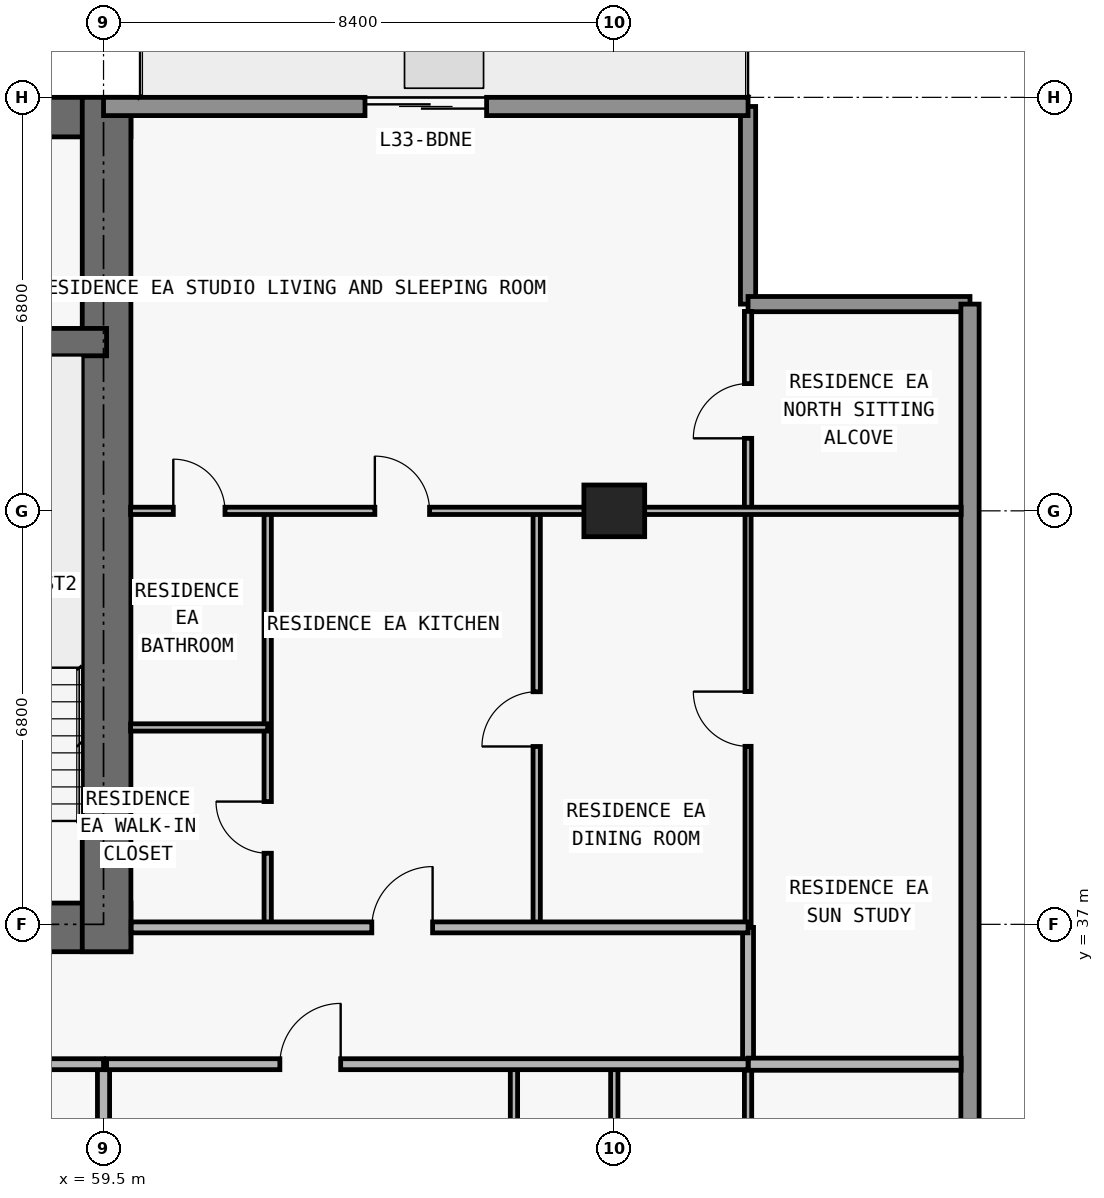
"""IFC4 building model, lengths in metres.
Left out: names, types, materials, properties, quantities, classifications, styles, units other than length and angle.
Written with IfcOpenShell. Run it as: python <this file> out.ifc"""

import sys

from ifc_helpers import new_model, si_unit, direction, frame, frame_2d, origin, origin_2d, place, context, subcontext, project, spatial, rectangle, extrude, element, fill, save


model = new_model("IFC4")
c1 = context("Model", 3, precision=1e-05, world=origin(), true_north=direction((0.0, 1.0)))
c2 = subcontext(c1, "Body", "Model", "MODEL_VIEW")
j1 = project(units=[si_unit("LENGTHUNIT", "METRE"), si_unit("PLANEANGLEUNIT", "RADIAN")], contexts=[c1])
p1 = place(None, origin())
s1 = spatial("IfcSite", under=j1, at=p1, CompositionType="ELEMENT")
p2 = place(p1, origin())
s2 = spatial("IfcBuilding", under=s1, at=p2, CompositionType="ELEMENT")
p3 = place(p2, frame((0.0, 0.0, 122.4)))
s3 = spatial("IfcBuildingStorey", under=s2, at=p3, CompositionType="ELEMENT", Elevation=122.4)
p4 = place(p3, frame((67.9, 43.8, 0.0), z_axis=(0.0, 0.0, 1.0), x_axis=(1.0, 0.0, 0.0)))
e1 = element("IfcColumn", 1, at=p4, inside=s3, PredefinedType="COLUMN", context=c2, shape_type="SweptSolid", body=[
    extrude(rectangle(XDim=1.0, YDim=0.85, at=origin_2d()), origin(), (0.0, 0.0, 1.0), 3.05),
])
p5 = place(p3, frame((17.85, 36.95, 0.0), z_axis=(0.0, 0.0, 1.0), x_axis=(1.0, 0.0, 0.0)))
e2 = element("IfcWall", 2, at=p5, inside=s3, PredefinedType="SHEAR", context=c2, shape_type="SweptSolid", body=[
    extrude(rectangle(XDim=42.1, YDim=0.8, at=frame_2d((21.05, 0.0))), origin(), (0.0, 0.0, 1.0), 3.05),
])
p6 = place(p5, frame((14.45, 0.0, 0.0)))
e3 = element("IfcOpeningElement", 3, at=p6, cuts=e2, PredefinedType="OPENING", context=c2, shape_type="SweptSolid", body=[
    extrude(rectangle(XDim=1.1, YDim=2.15, at=frame_2d((0.55, 1.075))), frame((0.0, 0.41, 0.0), z_axis=(0.0, -1.0, 0.0), x_axis=(1.0, 0.0, 0.0)), (0.0, 0.0, 1.0), 0.82),
])
p7 = place(p5, frame((6.3, 0.0, 0.0)))
e4 = element("IfcOpeningElement", 4, at=p7, cuts=e2, PredefinedType="OPENING", context=c2, shape_type="SweptSolid", body=[
    extrude(rectangle(XDim=1.05, YDim=2.15, at=frame_2d((0.525, 1.075))), frame((0.0, 0.41, 0.0), z_axis=(0.0, -1.0, 0.0), x_axis=(1.0, 0.0, 0.0)), (0.0, 0.0, 1.0), 0.82),
])
p8 = place(p5, frame((34.8, 0.0, 0.0)))
e5 = element("IfcOpeningElement", 5, at=p8, cuts=e2, PredefinedType="OPENING", context=c2, shape_type="SweptSolid", body=[
    extrude(rectangle(XDim=1.05, YDim=2.15, at=frame_2d((0.525, 1.075))), frame((0.0, 0.41, 0.0), z_axis=(0.0, -1.0, 0.0), x_axis=(1.0, 0.0, 0.0)), (0.0, 0.0, 1.0), 0.82),
])
p9 = place(p5, frame((10.913, 0.0, 0.0)))
e6 = element("IfcOpeningElement", 6, at=p9, cuts=e2, PredefinedType="OPENING", context=c2, shape_type="SweptSolid", body=[
    extrude(rectangle(XDim=1.05, YDim=2.15, at=frame_2d((0.525, 1.075))), frame((0.0, 0.41, 0.0), z_axis=(0.0, -1.0, 0.0), x_axis=(1.0, 0.0, 0.0)), (0.0, 0.0, 1.0), 0.82),
])
p10 = place(p5, frame((24.15, 0.0, 0.0)))
e7 = element("IfcOpeningElement", 7, at=p10, cuts=e2, PredefinedType="OPENING", context=c2, shape_type="SweptSolid", body=[
    extrude(rectangle(XDim=1.05, YDim=2.15, at=frame_2d((0.525, 1.075))), frame((0.0, 0.41, 0.0), z_axis=(0.0, -1.0, 0.0), x_axis=(1.0, 0.0, 0.0)), (0.0, 0.0, 1.0), 0.82),
])
p11 = place(p3, frame((17.85, 50.275, 0.0), z_axis=(0.0, 0.0, 1.0), x_axis=(1.0, 0.0, 0.0)))
e8 = element("IfcWall", 8, at=p11, inside=s3, PredefinedType="SHEAR", context=c2, shape_type="SweptSolid", body=[
    extrude(rectangle(XDim=42.1, YDim=0.65, at=frame_2d((21.05, 0.0))), origin(), (0.0, 0.0, 1.0), 3.05),
])
p12 = place(p3, frame((59.55, 36.55, 0.0), z_axis=(0.0, 0.0, 1.0), x_axis=(0.0, 1.0, 0.0)))
e9 = element("IfcWall", 9, at=p12, inside=s3, PredefinedType="SHEAR", context=c2, shape_type="SweptSolid", body=[
    extrude(rectangle(XDim=14.05, YDim=0.8, at=frame_2d((7.025, 0.0))), origin(), (0.0, 0.0, 1.0), 3.05),
])
p13 = place(p3, frame((18.25, 46.575, 0.0), z_axis=(0.0, 0.0, 1.0), x_axis=(1.0, 0.0, 0.0)))
e10 = element("IfcWall", 10, at=p13, inside=s3, PredefinedType="SHEAR", context=c2, shape_type="SweptSolid", body=[
    extrude(rectangle(XDim=41.3, YDim=0.45, at=frame_2d((20.65, 0.0))), origin(), (0.0, 0.0, 1.0), 3.05),
])
p14 = place(p13, frame((7.65, 0.0, 0.0)))
e11 = element("IfcOpeningElement", 11, at=p14, cuts=e10, PredefinedType="OPENING", context=c2, shape_type="SweptSolid", body=[
    extrude(rectangle(XDim=1.0, YDim=2.2, at=frame_2d((0.5, 1.1))), frame((0.0, 0.235, 0.0), z_axis=(0.0, -1.0, 0.0), x_axis=(1.0, 0.0, 0.0)), (0.0, 0.0, 1.0), 0.47),
])
p15 = place(p13, frame((32.675, 0.0, 0.0)))
e12 = element("IfcOpeningElement", 12, at=p15, cuts=e10, PredefinedType="OPENING", context=c2, shape_type="SweptSolid", body=[
    extrude(rectangle(XDim=1.05, YDim=2.15, at=frame_2d((0.525, 1.075))), frame((0.0, 0.235, 0.0), z_axis=(0.0, -1.0, 0.0), x_axis=(1.0, 0.0, 0.0)), (0.0, 0.0, 1.0), 0.47),
])
p16 = place(p3, frame((70.1, 50.45, 0.0), z_axis=(0.0, 0.0, 1.0), x_axis=(0.0, -1.0, 0.0)))
e13 = element("IfcWall", 13, at=p16, inside=s3, PredefinedType="ELEMENTEDWALL", context=c2, shape_type="SweptSolid", body=[
    extrude(rectangle(XDim=3.25, YDim=0.25, at=frame_2d((1.625, 0.0))), origin(), (0.0, 0.0, 1.0), 3.05),
])
p17 = place(p3, frame((70.1, 47.2, 0.0), z_axis=(0.0, 0.0, 1.0), x_axis=(1.0, 0.0, 0.0)))
e14 = element("IfcWall", 14, at=p17, inside=s3, PredefinedType="ELEMENTEDWALL", context=c2, shape_type="SweptSolid", body=[
    extrude(rectangle(XDim=3.65, YDim=0.25, at=frame_2d((1.825, 0.0))), origin(), (0.0, 0.0, 1.0), 3.05),
])
p18 = place(p3, frame((73.75, 47.2, 0.0), z_axis=(0.0, 0.0, 1.0), x_axis=(0.0, -1.0, 0.0)))
e15 = element("IfcWall", 15, at=p18, inside=s3, PredefinedType="STANDARD", context=c2, shape_type="SweptSolid", body=[
    extrude(rectangle(XDim=19.2, YDim=0.3, at=frame_2d((9.6, 0.0))), origin(), (0.0, 0.0, 1.0), 3.05),
])
p19 = place(p3, frame((59.5, 50.45, 0.0), z_axis=(0.0, 0.0, 1.0), x_axis=(1.0, 0.0, 0.0)))
e16 = element("IfcWall", 16, at=p19, inside=s3, PredefinedType="STANDARD", context=c2, shape_type="SweptSolid", body=[
    extrude(rectangle(XDim=10.6, YDim=0.3, at=frame_2d((5.3, 0.0))), origin(), (0.0, 0.0, 1.0), 3.05),
])
p20 = place(p19, frame((4.3, 0.0, 0.0)))
e17 = element("IfcOpeningElement", 17, at=p20, cuts=e16, PredefinedType="OPENING", context=c2, shape_type="SweptSolid", body=[
    extrude(rectangle(XDim=2.0, YDim=2.3, at=frame_2d((1.0, 1.15))), frame((0.0, 0.16, 0.0), z_axis=(0.0, -1.0, 0.0), x_axis=(1.0, 0.0, 0.0)), (0.0, 0.0, 1.0), 0.32),
])
p21 = place(p3, frame((59.5, 26.64, 0.0), z_axis=(0.0, 0.0, 1.0), x_axis=(0.0, 1.0, 0.0)))
e18 = element("IfcWall", 18, at=p21, inside=s3, PredefinedType="PARTITIONING", context=c2, shape_type="SweptSolid", body=[
    extrude(rectangle(XDim=8.06, YDim=0.2, at=frame_2d((4.03, 0.0))), origin(), (0.0, 0.0, 1.0), 2.174),
])
p22 = place(p3, frame((62.2, 36.95, 0.0), z_axis=(0.0, 0.0, 1.0), x_axis=(0.0, 1.0, 0.0)))
e19 = element("IfcWall", 19, at=p22, inside=s3, PredefinedType="PARTITIONING", context=c2, shape_type="SweptSolid", body=[
    extrude(rectangle(XDim=6.85, YDim=0.12, at=frame_2d((3.425, 0.0))), origin(), (0.0, 0.0, 1.0), 3.05),
])
p23 = place(p22, frame((1.219, 0.0, 0.0)))
e20 = element("IfcOpeningElement", 20, at=p23, cuts=e19, PredefinedType="OPENING", context=c2, shape_type="SweptSolid", body=[
    extrude(rectangle(XDim=0.85, YDim=2.1, at=frame_2d((0.425, 1.05))), frame((0.0, 0.07, 0.0), z_axis=(0.0, -1.0, 0.0), x_axis=(1.0, 0.0, 0.0)), (0.0, 0.0, 1.0), 0.14),
])
p24 = place(p3, frame((66.25, 26.64, 0.0), z_axis=(0.0, 0.0, 1.0), x_axis=(0.0, 1.0, 0.0)))
e21 = element("IfcWall", 21, at=p24, inside=s3, PredefinedType="PARTITIONING", context=c2, shape_type="SweptSolid", body=[
    extrude(rectangle(XDim=8.06, YDim=0.12, at=frame_2d((4.03, 0.0))), origin(), (0.0, 0.0, 1.0), 3.05),
])
p25 = place(p24, frame((3.755, 0.0, 0.0)))
e22 = element("IfcOpeningElement", 22, at=p25, cuts=e21, PredefinedType="OPENING", context=c2, shape_type="SweptSolid", body=[
    extrude(rectangle(XDim=0.85, YDim=2.1, at=frame_2d((0.425, 1.05))), frame((0.0, 0.07, 0.0), z_axis=(0.0, -1.0, 0.0), x_axis=(1.0, 0.0, 0.0)), (0.0, 0.0, 1.0), 0.14),
])
p26 = place(p3, frame((66.624, 36.95, 0.0), z_axis=(0.0, 0.0, 1.0), x_axis=(0.0, 1.0, 0.0)))
e23 = element("IfcWall", 23, at=p26, inside=s3, PredefinedType="PARTITIONING", context=c2, shape_type="SweptSolid", body=[
    extrude(rectangle(XDim=6.85, YDim=0.12, at=frame_2d((3.425, 0.0))), origin(), (0.0, 0.0, 1.0), 3.05),
])
p27 = place(p26, frame((2.975, 0.0, 0.0)))
e24 = element("IfcOpeningElement", 24, at=p27, cuts=e23, PredefinedType="OPENING", context=c2, shape_type="SweptSolid", body=[
    extrude(rectangle(XDim=0.9, YDim=2.15, at=frame_2d((0.45, 1.075))), frame((0.0, 0.07, 0.0), z_axis=(0.0, -1.0, 0.0), x_axis=(1.0, 0.0, 0.0)), (0.0, 0.0, 1.0), 0.14),
])
p28 = place(p3, frame((67.9, 26.64, 0.0), z_axis=(0.0, 0.0, 1.0), x_axis=(0.0, 1.0, 0.0)))
e25 = element("IfcWall", 25, at=p28, inside=s3, PredefinedType="PARTITIONING", context=c2, shape_type="SweptSolid", body=[
    extrude(rectangle(XDim=8.06, YDim=0.12, at=frame_2d((4.03, 0.0))), origin(), (0.0, 0.0, 1.0), 2.174),
])
p29 = place(p3, frame((70.1, 26.64, 0.0), z_axis=(0.0, 0.0, 1.0), x_axis=(0.0, 1.0, 0.0)))
e26 = element("IfcWall", 26, at=p29, inside=s3, PredefinedType="PARTITIONING", context=c2, shape_type="SweptSolid", body=[
    extrude(rectangle(XDim=8.06, YDim=0.12, at=frame_2d((4.03, 0.0))), origin(), (0.0, 0.0, 1.0), 3.05),
])
p30 = place(p3, frame((70.1, 34.705, 0.0), z_axis=(0.0, 0.0, 1.0), x_axis=(0.0, 1.0, 0.0)))
e27 = element("IfcWall", 27, at=p30, inside=s3, PredefinedType="PARTITIONING", context=c2, shape_type="SweptSolid", body=[
    extrude(rectangle(XDim=2.245, YDim=0.18, at=frame_2d((1.123, 0.0))), origin(), (0.0, 0.0, 1.0), 3.05),
])
p31 = place(p3, frame((70.1, 36.955, 0.0), z_axis=(0.0, 0.0, 1.0), x_axis=(0.0, 1.0, 0.0)))
e28 = element("IfcWall", 28, at=p31, inside=s3, PredefinedType="MOVABLE", context=c2, shape_type="SweptSolid", body=[
    extrude(rectangle(XDim=6.845, YDim=0.1, at=frame_2d((3.422, 0.0))), origin(), (0.0, 0.0, 1.0), 3.05),
])
p32 = place(p31, frame((2.972, 0.0, 0.0)))
e29 = element("IfcOpeningElement", 29, at=p32, cuts=e28, PredefinedType="OPENING", context=c2, shape_type="SweptSolid", body=[
    extrude(rectangle(XDim=0.9, YDim=2.15, at=frame_2d((0.45, 1.075))), frame((0.0, 0.06, 0.0), z_axis=(0.0, -1.0, 0.0), x_axis=(1.0, 0.0, 0.0)), (0.0, 0.0, 1.0), 0.12),
])
p33 = place(p3, frame((70.1, 43.805, 0.0), z_axis=(0.0, 0.0, 1.0), x_axis=(0.0, 1.0, 0.0)))
e30 = element("IfcWall", 30, at=p33, inside=s3, PredefinedType="PARTITIONING", context=c2, shape_type="SweptSolid", body=[
    extrude(rectangle(XDim=3.275, YDim=0.12, at=frame_2d((1.638, 0.0))), origin(), (0.0, 0.0, 1.0), 3.05),
])
p34 = place(p33, frame((1.188, 0.0, 0.0)))
e31 = element("IfcOpeningElement", 31, at=p34, cuts=e30, PredefinedType="OPENING", context=c2, shape_type="SweptSolid", body=[
    extrude(rectangle(XDim=0.9, YDim=2.15, at=frame_2d((0.45, 1.075))), frame((0.0, 0.07, 0.0), z_axis=(0.0, -1.0, 0.0), x_axis=(1.0, 0.0, 0.0)), (0.0, 0.0, 1.0), 0.14),
])
p35 = place(p3, frame((18.3, 34.7, 0.0), z_axis=(0.0, 0.0, 1.0), x_axis=(1.0, 0.0, 0.0)))
e32 = element("IfcWall", 32, at=p35, inside=s3, PredefinedType="PARTITIONING", context=c2, shape_type="SweptSolid", body=[
    extrude(rectangle(XDim=41.2, YDim=0.18, at=frame_2d((20.6, 0.0))), origin(), (0.0, 0.0, 1.0), 3.05),
])
p36 = place(p35, frame((2.875, 0.0, 0.0)))
e33 = element("IfcOpeningElement", 33, at=p36, cuts=e32, PredefinedType="OPENING", context=c2, shape_type="SweptSolid", body=[
    extrude(rectangle(XDim=1.0, YDim=2.2, at=frame_2d((0.5, 1.1))), frame((0.0, 0.1, 0.0), z_axis=(0.0, -1.0, 0.0), x_axis=(1.0, 0.0, 0.0)), (0.0, 0.0, 1.0), 0.2),
])
p37 = place(p35, frame((11.275, 0.0, 0.0)))
e34 = element("IfcOpeningElement", 34, at=p37, cuts=e32, PredefinedType="OPENING", context=c2, shape_type="SweptSolid", body=[
    extrude(rectangle(XDim=1.0, YDim=2.2, at=frame_2d((0.5, 1.1))), frame((0.0, 0.1, 0.0), z_axis=(0.0, -1.0, 0.0), x_axis=(1.0, 0.0, 0.0)), (0.0, 0.0, 1.0), 0.2),
])
p38 = place(p35, frame((19.275, 0.0, 0.0)))
e35 = element("IfcOpeningElement", 35, at=p38, cuts=e32, PredefinedType="OPENING", context=c2, shape_type="SweptSolid", body=[
    extrude(rectangle(XDim=1.0, YDim=2.2, at=frame_2d((0.5, 1.1))), frame((0.0, 0.1, 0.0), z_axis=(0.0, -1.0, 0.0), x_axis=(1.0, 0.0, 0.0)), (0.0, 0.0, 1.0), 0.2),
])
p39 = place(p35, frame((27.275, 0.0, 0.0)))
e36 = element("IfcOpeningElement", 36, at=p39, cuts=e32, PredefinedType="OPENING", context=c2, shape_type="SweptSolid", body=[
    extrude(rectangle(XDim=1.0, YDim=2.2, at=frame_2d((0.5, 1.1))), frame((0.0, 0.1, 0.0), z_axis=(0.0, -1.0, 0.0), x_axis=(1.0, 0.0, 0.0)), (0.0, 0.0, 1.0), 0.2),
])
p40 = place(p35, frame((35.675, 0.0, 0.0)))
e37 = element("IfcOpeningElement", 37, at=p40, cuts=e32, PredefinedType="OPENING", context=c2, shape_type="SweptSolid", body=[
    extrude(rectangle(XDim=1.0, YDim=2.2, at=frame_2d((0.5, 1.1))), frame((0.0, 0.1, 0.0), z_axis=(0.0, -1.0, 0.0), x_axis=(1.0, 0.0, 0.0)), (0.0, 0.0, 1.0), 0.2),
])
p41 = place(p3, frame((59.55, 34.7, 0.0), z_axis=(0.0, 0.0, 1.0), x_axis=(1.0, 0.0, 0.0)))
e38 = element("IfcWall", 38, at=p41, inside=s3, PredefinedType="PARTITIONING", context=c2, shape_type="SweptSolid", body=[
    extrude(rectangle(XDim=10.55, YDim=0.18, at=frame_2d((5.275, 0.0))), origin(), (0.0, 0.0, 1.0), 3.05),
])
p42 = place(p41, frame((2.85, 0.0, 0.0)))
e39 = element("IfcOpeningElement", 39, at=p42, cuts=e38, PredefinedType="OPENING", context=c2, shape_type="SweptSolid", body=[
    extrude(rectangle(XDim=1.0, YDim=2.2, at=frame_2d((0.5, 1.1))), frame((0.0, 0.1, 0.0), z_axis=(0.0, -1.0, 0.0), x_axis=(1.0, 0.0, 0.0)), (0.0, 0.0, 1.0), 0.2),
])
p43 = place(p3, frame((70.105, 34.7, 0.0), z_axis=(0.0, 0.0, 1.0), x_axis=(1.0, 0.0, 0.0)))
e40 = element("IfcWall", 40, at=p43, inside=s3, PredefinedType="PARTITIONING", context=c2, shape_type="SweptSolid", body=[
    extrude(rectangle(XDim=3.5, YDim=0.2, at=frame_2d((1.75, 0.0))), origin(), (0.0, 0.0, 1.0), 3.05),
])
p44 = place(p3, frame((59.955, 36.95, 0.0), z_axis=(0.0, 0.0, 1.0), x_axis=(1.0, 0.0, 0.0)))
e41 = element("IfcWall", 41, at=p44, inside=s3, PredefinedType="PARTITIONING", context=c2, shape_type="SweptSolid", body=[
    extrude(rectangle(XDim=10.145, YDim=0.18, at=frame_2d((5.073, 0.0))), origin(), (0.0, 0.0, 1.0), 3.05),
])
p45 = place(p44, frame((3.957, 0.0, 0.0)))
e42 = element("IfcOpeningElement", 42, at=p45, cuts=e41, PredefinedType="OPENING", context=c2, shape_type="SweptSolid", body=[
    extrude(rectangle(XDim=1.0, YDim=2.2, at=frame_2d((0.5, 1.1))), frame((0.0, 0.1, 0.0), z_axis=(0.0, -1.0, 0.0), x_axis=(1.0, 0.0, 0.0)), (0.0, 0.0, 1.0), 0.2),
])
p46 = place(p3, frame((59.945, 40.238, 0.0), z_axis=(0.0, 0.0, 1.0), x_axis=(1.0, 0.0, 0.0)))
e43 = element("IfcWall", 43, at=p46, inside=s3, PredefinedType="PARTITIONING", context=c2, shape_type="SweptSolid", body=[
    extrude(rectangle(XDim=2.255, YDim=0.12, at=frame_2d((1.127, 0.0))), origin(), (0.0, 0.0, 1.0), 3.05),
])
p47 = place(p3, frame((59.945, 43.8, 0.0), z_axis=(0.0, 0.0, 1.0), x_axis=(1.0, 0.0, 0.0)))
e44 = element("IfcWall", 44, at=p47, inside=s3, PredefinedType="PARTITIONING", context=c2, shape_type="SweptSolid", body=[
    extrude(rectangle(XDim=13.66, YDim=0.12, at=frame_2d((6.83, 0.0))), origin(), (0.0, 0.0, 1.0), 2.339),
])
p48 = place(p47, frame((4.017, 0.0, 0.0)))
e45 = element("IfcOpeningElement", 45, at=p48, cuts=e44, PredefinedType="OPENING", context=c2, shape_type="SweptSolid", body=[
    extrude(rectangle(XDim=0.9, YDim=2.15, at=frame_2d((0.45, 1.075))), frame((0.0, 0.07, 0.0), z_axis=(0.0, -1.0, 0.0), x_axis=(1.0, 0.0, 0.0)), (0.0, 0.0, 1.0), 0.14),
])
p49 = place(p47, frame((0.702, 0.0, 0.0)))
e46 = element("IfcOpeningElement", 46, at=p49, cuts=e44, PredefinedType="OPENING", context=c2, shape_type="SweptSolid", body=[
    extrude(rectangle(XDim=0.85, YDim=2.1, at=frame_2d((0.425, 1.05))), frame((0.0, 0.07, 0.0), z_axis=(0.0, -1.0, 0.0), x_axis=(1.0, 0.0, 0.0)), (0.0, 0.0, 1.0), 0.14),
])
p50 = place(p20, origin())
e47 = element("IfcDoor", 47, at=p50, inside=s3, OperationType="DOUBLE_DOOR_SLIDING", PredefinedType="DOOR", context=c2, shape_type="SweptSolid", body=[
    extrude(rectangle(XDim=2.0, YDim=2.3, at=frame_2d((1.0, 1.15))), frame((0.0, 0.025, 0.0), z_axis=(0.0, -1.0, 0.0), x_axis=(1.0, 0.0, 0.0)), (0.0, 0.0, 1.0), 0.05),
])
fill(e17, e47)
p51 = place(p42, origin())
e48 = element("IfcDoor", 48, at=p51, inside=s3, OperationType="SINGLE_SWING_RIGHT", PredefinedType="DOOR", context=c2, shape_type="SweptSolid", body=[
    extrude(rectangle(XDim=1.0, YDim=2.2, at=frame_2d((0.5, 1.1))), frame((0.0, 0.025, 0.0), z_axis=(0.0, -1.0, 0.0), x_axis=(1.0, 0.0, 0.0)), (0.0, 0.0, 1.0), 0.05),
])
fill(e39, e48)
p52 = place(p27, origin())
e49 = element("IfcDoor", 49, at=p52, inside=s3, OperationType="SINGLE_SWING_LEFT", PredefinedType="DOOR", context=c2, shape_type="SweptSolid", body=[
    extrude(rectangle(XDim=0.9, YDim=2.15, at=frame_2d((0.45, 1.075))), frame((0.0, 0.025, 0.0), z_axis=(0.0, -1.0, 0.0), x_axis=(1.0, 0.0, 0.0)), (0.0, 0.0, 1.0), 0.05),
])
fill(e24, e49)
p53 = place(p45, origin())
e50 = element("IfcDoor", 50, at=p53, inside=s3, OperationType="SINGLE_SWING_RIGHT", PredefinedType="DOOR", context=c2, shape_type="SweptSolid", body=[
    extrude(rectangle(XDim=1.0, YDim=2.2, at=frame_2d((0.5, 1.1))), frame((0.0, 0.025, 0.0), z_axis=(0.0, -1.0, 0.0), x_axis=(1.0, 0.0, 0.0)), (0.0, 0.0, 1.0), 0.05),
])
fill(e42, e50)
p54 = place(p48, origin())
e51 = element("IfcDoor", 51, at=p54, inside=s3, OperationType="SINGLE_SWING_LEFT", PredefinedType="DOOR", context=c2, shape_type="SweptSolid", body=[
    extrude(rectangle(XDim=0.9, YDim=2.15, at=frame_2d((0.45, 1.075))), frame((0.0, 0.025, 0.0), z_axis=(0.0, -1.0, 0.0), x_axis=(1.0, 0.0, 0.0)), (0.0, 0.0, 1.0), 0.05),
])
fill(e45, e51)
p55 = place(p23, origin())
e52 = element("IfcDoor", 52, at=p55, inside=s3, OperationType="SINGLE_SWING_RIGHT", PredefinedType="DOOR", context=c2, shape_type="SweptSolid", body=[
    extrude(rectangle(XDim=0.85, YDim=2.1, at=frame_2d((0.425, 1.05))), frame((0.0, 0.025, 0.0), z_axis=(0.0, -1.0, 0.0), x_axis=(1.0, 0.0, 0.0)), (0.0, 0.0, 1.0), 0.05),
])
fill(e20, e52)
p56 = place(p49, origin())
e53 = element("IfcDoor", 53, at=p56, inside=s3, OperationType="SINGLE_SWING_LEFT", PredefinedType="DOOR", context=c2, shape_type="SweptSolid", body=[
    extrude(rectangle(XDim=0.85, YDim=2.1, at=frame_2d((0.425, 1.05))), frame((0.0, 0.025, 0.0), z_axis=(0.0, -1.0, 0.0), x_axis=(1.0, 0.0, 0.0)), (0.0, 0.0, 1.0), 0.05),
])
fill(e46, e53)
p57 = place(p32, origin())
e54 = element("IfcDoor", 54, at=p57, inside=s3, OperationType="SINGLE_SWING_RIGHT", PredefinedType="DOOR", context=c2, shape_type="SweptSolid", body=[
    extrude(rectangle(XDim=0.9, YDim=2.15, at=frame_2d((0.45, 1.075))), frame((0.0, 0.025, 0.0), z_axis=(0.0, -1.0, 0.0), x_axis=(1.0, 0.0, 0.0)), (0.0, 0.0, 1.0), 0.05),
])
fill(e29, e54)
p58 = place(p34, origin())
e55 = element("IfcDoor", 55, at=p58, inside=s3, OperationType="SINGLE_SWING_LEFT", PredefinedType="DOOR", context=c2, shape_type="SweptSolid", body=[
    extrude(rectangle(XDim=0.9, YDim=2.15, at=frame_2d((0.45, 1.075))), frame((0.0, 0.025, 0.0), z_axis=(0.0, -1.0, 0.0), x_axis=(1.0, 0.0, 0.0)), (0.0, 0.0, 1.0), 0.05),
])
fill(e31, e55)
save(model, sys.argv[1])
